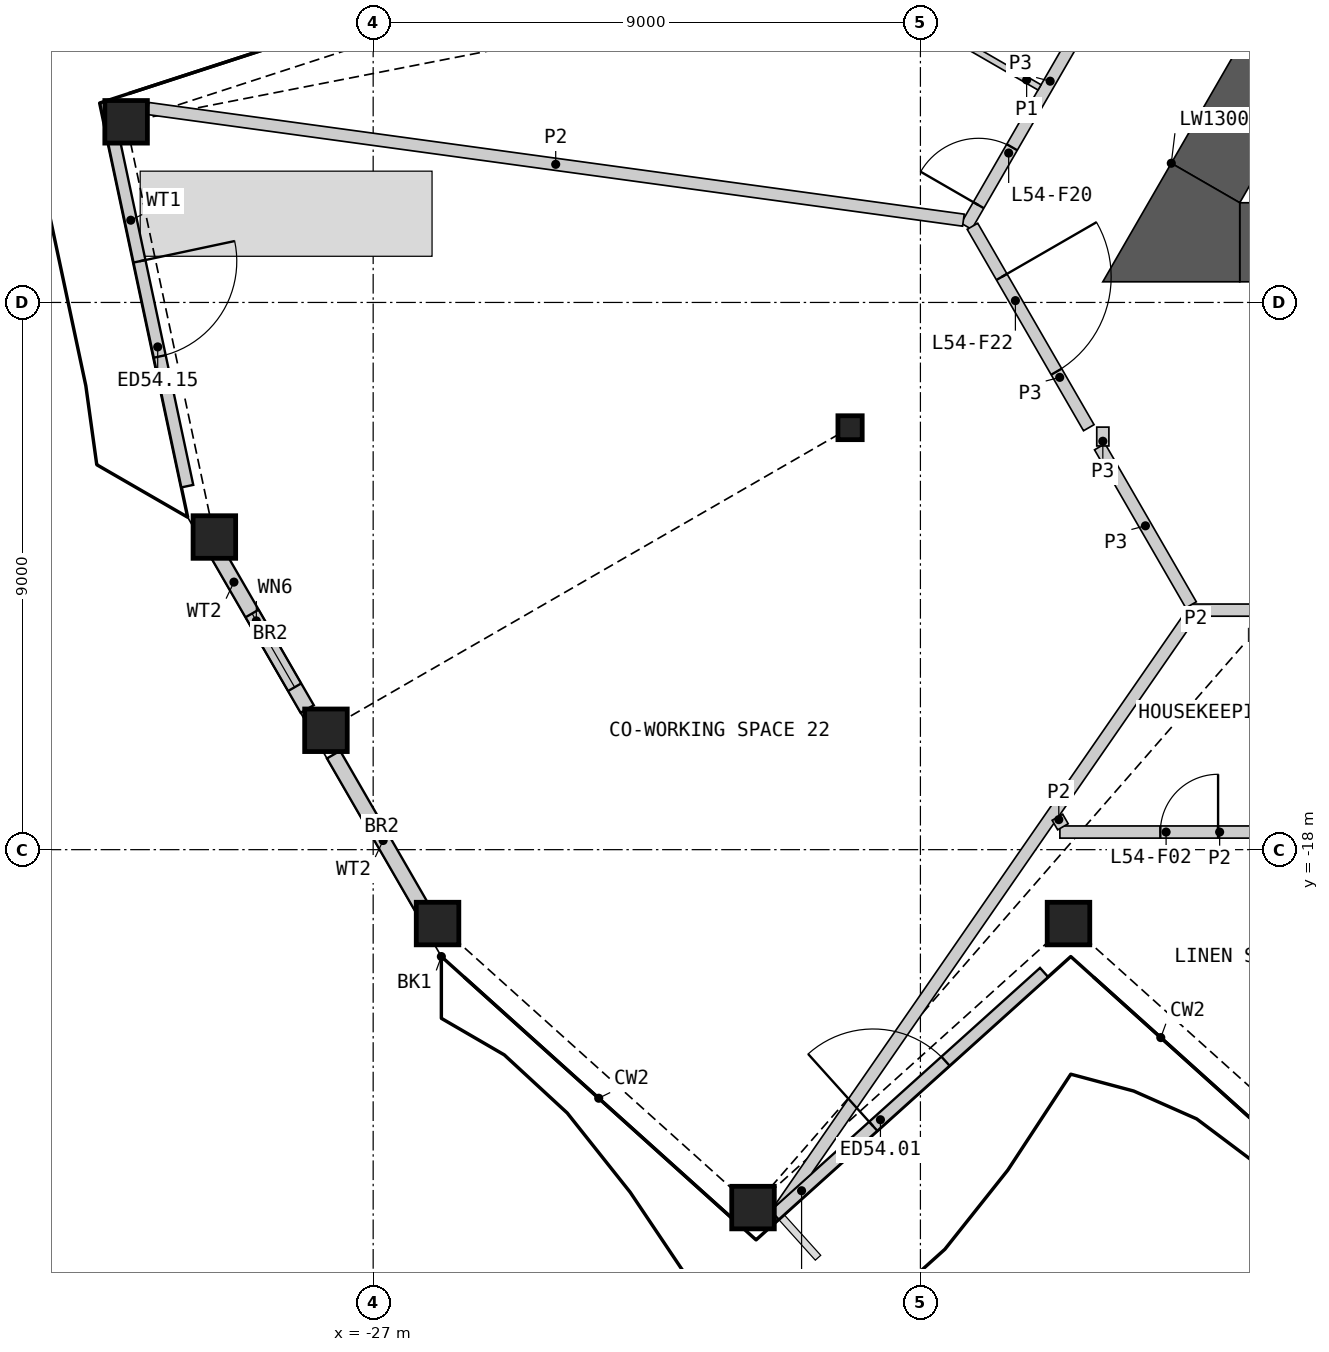
"""IFC4 building model, lengths in metres.
Left out: names, types, materials, properties, quantities, classifications, styles, units other than length and angle.
Written with IfcOpenShell. Run it as: python <this file> out.ifc"""

import sys

from ifc_helpers import new_model, si_unit, direction, frame, frame_2d, origin, origin_2d, place, context, subcontext, project, spatial, polyline, rectangle, hollow_rectangle, i_section, outline, extrude, element, fill, save


model = new_model("IFC4")
c1 = context("Model", 3, precision=1e-05, world=origin(), true_north=direction((0.0, 1.0)))
c2 = subcontext(c1, "Body", "Model", "MODEL_VIEW")
j1 = project(units=[si_unit("LENGTHUNIT", "METRE"), si_unit("PLANEANGLEUNIT", "RADIAN")], contexts=[c1])
p1 = place(None, origin())
s1 = spatial("IfcSite", under=j1, at=p1, CompositionType="ELEMENT")
p2 = place(p1, origin())
s2 = spatial("IfcBuilding", under=s1, at=p2, CompositionType="ELEMENT")
p3 = place(p2, frame((0.0, 0.0, 245.4)))
s3 = spatial("IfcBuildingStorey", under=s2, at=p3, CompositionType="ELEMENT", Elevation=245.4)
for number, where, z_axis, x_axis in (
    (1, (-25.941, -19.215, 0.0), (0.0, 0.0, 1.0), (1.0, 0.0, 0.0)),
    (2, (-20.753, -23.887, 0.0), (0.0, 0.0, 1.0), (1.0, 0.0, 0.0)),
    (3, (-15.565, -19.215, 0.0), (0.0, 0.0, 1.0), (1.0, 0.0, 0.0)),
    (4, (-31.063, -6.029, 0.0), (0.0, 0.0, 1.0), (1.0, 0.0, 0.0)),
    (5, (-29.612, -12.858, 0.0), (0.0, 0.0, 1.0), (1.0, 0.0, 0.0)),
    (6, (-27.776, -16.037, 0.0), (0.0, 0.0, 1.0), (1.0, 0.0, 0.0)),
):
    element("IfcColumn", number, at=place(p3, frame(where, z_axis=z_axis, x_axis=x_axis)), inside=s3, PredefinedType="COLUMN", context=c2, shape_type="SweptSolid", body=[
        extrude(hollow_rectangle(XDim=0.7, YDim=0.7, WallThickness=0.045, at=origin_2d()), origin(), (0.0, 0.0, 1.0), 3.6),
    ])
p4 = place(p3, frame((-19.157, -11.06, 0.0), z_axis=(0.0, 0.0, 1.0), x_axis=(1.0, 0.0, 0.0)))
e7 = element("IfcColumn", 7, at=p4, inside=s3, PredefinedType="COLUMN", context=c2, shape_type="SweptSolid", body=[
    extrude(i_section(OverallWidth=0.399, OverallDepth=0.393, WebThickness=0.023, FlangeThickness=0.037, at=origin_2d()), origin(), (0.0, 0.0, 1.0), 3.6),
])
p5 = place(p3, frame((-20.397, -24.009, 0.0), z_axis=(0.0, 0.0, 1.0), x_axis=(0.74315161366, 0.669123067241, 0.0)))
e8 = element("IfcWall", 8, at=p5, inside=s3, PredefinedType="SOLIDWALL", context=c2, shape_type="SweptSolid", body=[
    extrude(rectangle(XDim=5.963, YDim=0.2, at=frame_2d((2.981, 0.0))), origin(), (0.0, 0.0, 1.0), 2.701),
])
p6 = place(p5, frame((2.181, 0.0, 0.0)))
e9 = element("IfcOpeningElement", 9, at=p6, cuts=e8, PredefinedType="OPENING", context=c2, shape_type="SweptSolid", body=[
    extrude(rectangle(XDim=1.6, YDim=2.4, at=frame_2d((0.8, 1.2))), frame((0.0, 0.11, 0.0), z_axis=(0.0, -1.0, 0.0), x_axis=(1.0, 0.0, 0.0)), (0.0, 0.0, 1.0), 0.22),
])
p7 = place(p3, frame((-31.296, -6.189, 0.0), z_axis=(0.0, 0.0, 1.0), x_axis=(0.207920947907, -0.978145633033, 0.0)))
e10 = element("IfcWall", 10, at=p7, inside=s3, PredefinedType="SOLIDWALL", context=c2, shape_type="SweptSolid", body=[
    extrude(rectangle(XDim=5.963, YDim=0.2, at=frame_2d((2.981, 0.0))), origin(), (0.0, 0.0, 1.0), 2.701),
])
p8 = place(p7, frame((2.181, 0.0, 0.0)))
e11 = element("IfcOpeningElement", 11, at=p8, cuts=e10, PredefinedType="OPENING", context=c2, shape_type="SweptSolid", body=[
    extrude(rectangle(XDim=1.6, YDim=2.4, at=frame_2d((0.8, 1.2))), frame((0.0, 0.11, 0.0), z_axis=(0.0, -1.0, 0.0), x_axis=(1.0, 0.0, 0.0)), (0.0, 0.0, 1.0), 0.22),
])
p9 = place(p3, frame((-29.692, -12.904, 0.0), z_axis=(0.0, 0.0, 1.0), x_axis=(0.499987708133, -0.866032500381, 0.0)))
e12 = element("IfcWall", 12, at=p9, inside=s3, PredefinedType="SOLIDWALL", context=c2, shape_type="SweptSolid", body=[
    extrude(rectangle(XDim=3.213, YDim=0.25, at=frame_2d((1.607, 0.0))), origin(), (0.0, 0.0, 1.0), 2.701),
])
p10 = place(p9, frame((1.4, 0.0, 1.9)))
e13 = element("IfcOpeningElement", 13, at=p10, cuts=e12, PredefinedType="OPENING", context=c2, shape_type="SweptSolid", body=[
    extrude(rectangle(XDim=1.4, YDim=0.6, at=frame_2d((0.7, 0.3))), frame((0.0, 0.135, 0.0), z_axis=(0.0, -1.0, 0.0), x_axis=(1.0, 0.0, 0.0)), (0.0, 0.0, 1.0), 0.27),
])
p11 = place(p3, frame((-27.652, -16.437, 0.0), z_axis=(0.0, 0.0, 1.0), x_axis=(0.500026945261, -0.866009846372, 0.0)))
e14 = element("IfcWall", 14, at=p11, inside=s3, PredefinedType="SOLIDWALL", context=c2, shape_type="SweptSolid", body=[
    extrude(rectangle(XDim=3.262, YDim=0.25, at=frame_2d((1.631, 0.0))), origin(), (0.0, 0.0, 1.0), 2.701),
])
p12 = place(p3, frame((-12.748, -8.01, 0.0), z_axis=(0.0, 0.0, 1.0), x_axis=(1.0, 0.0, 0.0)))
e15 = element("IfcWall", 15, at=p12, inside=s3, PredefinedType="SHEAR", context=c2, shape_type="SweptSolid", body=[
    extrude(rectangle(XDim=4.26, YDim=1.3, at=frame_2d((2.13, 0.0))), origin(), (0.0, 0.0, 1.0), 3.25),
])
p13 = place(p3, frame((-10.338, -1.885, 0.0), z_axis=(0.0, 0.0, 1.0), x_axis=(-0.499975944838, -0.866039291593, 0.0)))
e16 = element("IfcWall", 16, at=p13, inside=s3, PredefinedType="SHEAR", context=c2, shape_type="SweptSolid", body=[
    extrude(rectangle(XDim=5.947, YDim=1.3, at=frame_2d((2.974, 0.0))), origin(), (0.0, 0.0, 1.0), 3.25),
])
p14 = place(p3, origin())
e17 = element("IfcWall", 17, at=p14, inside=s3, PredefinedType="SHEAR", context=c2, shape_type="SweptSolid", body=[
    extrude(outline(polyline([(-13.874, -6.71), (-12.748, -7.36), (-12.748, -8.66), (-15.0, -8.66), (-13.874, -6.71)])), origin(), (0.0, 0.0, 1.0), 3.25),
])
p15 = place(p3, frame((-13.599, -14.06, 0.0), z_axis=(0.0, 0.0, 1.0), x_axis=(1.0, 0.0, 0.0)))
e18 = element("IfcWall", 18, at=p15, inside=s3, PredefinedType="PARTITIONING", context=c2, shape_type="SweptSolid", body=[
    extrude(rectangle(XDim=27.198, YDim=0.2, at=frame_2d((13.599, 0.0))), origin(), (0.0, 0.0, 1.0), 3.25),
])
p16 = place(p15, frame((1.152, 0.0, 0.0)))
e19 = element("IfcOpeningElement", 19, at=p16, cuts=e18, PredefinedType="OPENING", context=c2, shape_type="SweptSolid", body=[
    extrude(rectangle(XDim=0.95, YDim=2.1, at=frame_2d((0.475, 1.05))), frame((0.0, 0.11, 0.0), z_axis=(0.0, -1.0, 0.0), x_axis=(1.0, 0.0, 0.0)), (0.0, 0.0, 1.0), 0.22),
])
p17 = place(p15, frame((16.311, 0.0, 0.0)))
e20 = element("IfcOpeningElement", 20, at=p17, cuts=e18, PredefinedType="OPENING", context=c2, shape_type="SweptSolid", body=[
    extrude(rectangle(XDim=1.1, YDim=2.1, at=frame_2d((0.55, 1.05))), frame((0.0, 0.11, 0.0), z_axis=(0.0, -1.0, 0.0), x_axis=(1.0, 0.0, 0.0)), (0.0, 0.0, 1.0), 0.22),
])
p18 = place(p15, frame((25.747, 0.0, 0.0)))
e21 = element("IfcOpeningElement", 21, at=p18, cuts=e18, PredefinedType="OPENING", context=c2, shape_type="SweptSolid", body=[
    extrude(rectangle(XDim=1.1, YDim=2.1, at=frame_2d((0.55, 1.05))), frame((0.0, 0.11, 0.0), z_axis=(0.0, -1.0, 0.0), x_axis=(1.0, 0.0, 0.0)), (0.0, 0.0, 1.0), 0.22),
])
p19 = place(p3, frame((-17.244, -7.747, 0.0), z_axis=(0.0, 0.0, 1.0), x_axis=(0.500017753321, 0.866015153657, 0.0)))
e22 = element("IfcWall", 22, at=p19, inside=s3, PredefinedType="PARTITIONING", context=c2, shape_type="SweptSolid", body=[
    extrude(rectangle(XDim=5.51, YDim=0.2, at=frame_2d((2.755, 0.0))), origin(), (0.0, 0.0, 1.0), 3.25),
])
p20 = place(p19, frame((0.401, 0.0, 0.0)))
e23 = element("IfcOpeningElement", 23, at=p20, cuts=e22, PredefinedType="OPENING", context=c2, shape_type="SweptSolid", body=[
    extrude(rectangle(XDim=1.1, YDim=2.1, at=frame_2d((0.55, 1.05))), frame((0.0, 0.11, 0.0), z_axis=(0.0, -1.0, 0.0), x_axis=(1.0, 0.0, 0.0)), (0.0, 0.0, 1.0), 0.22),
])
p21 = place(p3, frame((-17.144, -7.747, 0.0), z_axis=(0.0, 0.0, 1.0), x_axis=(0.499961815444, -0.866047448526, 0.0)))
e24 = element("IfcWall", 24, at=p21, inside=s3, PredefinedType="PARTITIONING", context=c2, shape_type="SweptSolid", body=[
    extrude(rectangle(XDim=3.826, YDim=0.2, at=frame_2d((1.913, 0.0))), origin(), (0.0, 0.0, 1.0), 3.25),
])
p22 = place(p21, frame((0.962, 0.0, 0.0)))
e25 = element("IfcOpeningElement", 25, at=p22, cuts=e24, PredefinedType="OPENING", context=c2, shape_type="SweptSolid", body=[
    extrude(rectangle(XDim=1.8, YDim=2.1, at=frame_2d((0.9, 1.05))), frame((0.0, 0.11, 0.0), z_axis=(0.0, -1.0, 0.0), x_axis=(1.0, 0.0, 0.0)), (0.0, 0.0, 1.0), 0.22),
])
p23 = place(p3, frame((-15.05, -11.374, 0.0), z_axis=(0.0, 0.0, 1.0), x_axis=(0.500048608389, -0.865997337899, 0.0)))
e26 = element("IfcWall", 26, at=p23, inside=s3, PredefinedType="PARTITIONING", context=c2, shape_type="SweptSolid", body=[
    extrude(rectangle(XDim=3.002, YDim=0.2, at=frame_2d((1.501, 0.0))), origin(), (0.0, 0.0, 1.0), 3.25),
])
p24 = place(p3, frame((-15.0, -11.36, 0.0), z_axis=(0.0, 0.0, 1.0), x_axis=(0.0, 1.0, 0.0)))
e27 = element("IfcWall", 27, at=p24, inside=s3, PredefinedType="PARTITIONING", context=c2, shape_type="SweptSolid", body=[
    extrude(rectangle(XDim=0.31, YDim=0.2, at=frame_2d((0.155, 0.0))), origin(), (0.0, 0.0, 1.0), 3.25),
])
p25 = place(p3, frame((-30.703, -5.81, 0.0), z_axis=(0.0, 0.0, 1.0), x_axis=(0.99075075074, -0.135694325259, 0.0)))
e28 = element("IfcWall", 28, at=p25, inside=s3, PredefinedType="PARTITIONING", context=c2, shape_type="SweptSolid", body=[
    extrude(rectangle(XDim=13.535, YDim=0.2, at=frame_2d((6.768, 0.0))), origin(), (0.0, 0.0, 1.0), 2.404),
])
p26 = place(p3, origin())
e29 = element("IfcWall", 29, at=p26, inside=s3, PredefinedType="PARTITIONING", context=c2, shape_type="SweptSolid", body=[
    extrude(outline(polyline([(-13.473, -14.199), (-19.794, -23.331), (-20.439, -23.912), (-13.638, -14.086), (-13.473, -14.199)])), origin(), (0.0, 0.0, 1.0), 2.404),
])
p27 = place(p3, frame((-15.706, -17.71, 0.0), z_axis=(0.0, 0.0, 1.0), x_axis=(1.0, 0.0, 0.0)))
e30 = element("IfcWall", 30, at=p27, inside=s3, PredefinedType="PARTITIONING", context=c2, shape_type="SweptSolid", body=[
    extrude(rectangle(XDim=5.255, YDim=0.2, at=frame_2d((2.627, 0.0))), origin(), (0.0, 0.0, 1.0), 2.404),
])
p28 = place(p27, frame((1.652, 0.0, 0.0)))
e31 = element("IfcOpeningElement", 31, at=p28, cuts=e30, PredefinedType="OPENING", context=c2, shape_type="SweptSolid", body=[
    extrude(rectangle(XDim=0.95, YDim=2.1, at=frame_2d((0.475, 1.05))), frame((0.0, 0.11, 0.0), z_axis=(0.0, -1.0, 0.0), x_axis=(1.0, 0.0, 0.0)), (0.0, 0.0, 1.0), 0.22),
])
p29 = place(p3, frame((-15.747, -17.467, 0.0), z_axis=(0.0, 0.0, 1.0), x_axis=(0.498749683645, -0.866746071848, 0.0)))
e32 = element("IfcWall", 32, at=p29, inside=s3, PredefinedType="PARTITIONING", context=c2, shape_type="SweptSolid", body=[
    extrude(rectangle(XDim=0.181, YDim=0.2, at=frame_2d((0.091, 0.0))), origin(), (0.0, 0.0, 1.0), 2.404),
])
p30 = place(p3, frame((-18.163, -4.238, 0.0), z_axis=(0.0, 0.0, 1.0), x_axis=(0.866014668023, -0.500018594424, 0.0)))
e33 = element("IfcWall", 33, at=p30, inside=s3, PredefinedType="PARTITIONING", context=c2, shape_type="SweptSolid", body=[
    extrude(rectangle(XDim=2.45, YDim=0.1, at=frame_2d((1.225, 0.0))), origin(), (0.0, 0.0, 1.0), 2.404),
])
p31 = place(p6, origin())
e34 = element("IfcDoor", 34, at=p31, inside=s3, OperationType="DOUBLE_DOOR_SINGLE_SWING", PredefinedType="DOOR", context=c2, shape_type="SweptSolid", body=[
    extrude(rectangle(XDim=1.6, YDim=2.4, at=frame_2d((0.8, 1.2))), frame((0.0, 0.025, 0.0), z_axis=(0.0, -1.0, 0.0), x_axis=(1.0, 0.0, 0.0)), (0.0, 0.0, 1.0), 0.05),
])
fill(e9, e34)
p32 = place(p8, origin())
e35 = element("IfcDoor", 35, at=p32, inside=s3, OperationType="DOUBLE_DOOR_SINGLE_SWING", PredefinedType="DOOR", context=c2, shape_type="SweptSolid", body=[
    extrude(rectangle(XDim=1.6, YDim=2.4, at=frame_2d((0.8, 1.2))), frame((0.0, 0.025, 0.0), z_axis=(0.0, -1.0, 0.0), x_axis=(1.0, 0.0, 0.0)), (0.0, 0.0, 1.0), 0.05),
])
fill(e11, e35)
p33 = place(p10, origin())
e36 = element("IfcWindow", 36, at=p33, inside=s3, PartitioningType="SINGLE_PANEL", PredefinedType="WINDOW", context=c2, shape_type="SweptSolid", body=[
    extrude(rectangle(XDim=1.4, YDim=0.6, at=frame_2d((0.7, 0.3))), frame((0.0, 0.03, 0.0), z_axis=(0.0, -1.0, 0.0), x_axis=(1.0, 0.0, 0.0)), (0.0, 0.0, 1.0), 0.06),
])
fill(e13, e36)
p34 = place(p28, origin())
e37 = element("IfcDoor", 37, at=p34, inside=s3, OperationType="SINGLE_SWING_RIGHT", PredefinedType="DOOR", context=c2, shape_type="SweptSolid", body=[
    extrude(rectangle(XDim=0.95, YDim=2.1, at=frame_2d((0.475, 1.05))), frame((0.0, 0.025, 0.0), z_axis=(0.0, -1.0, 0.0), x_axis=(1.0, 0.0, 0.0)), (0.0, 0.0, 1.0), 0.05),
])
fill(e31, e37)
p35 = place(p20, origin())
e38 = element("IfcDoor", 38, at=p35, inside=s3, OperationType="SINGLE_SWING_LEFT", PredefinedType="DOOR", context=c2, shape_type="SweptSolid", body=[
    extrude(rectangle(XDim=1.1, YDim=2.1, at=frame_2d((0.55, 1.05))), frame((0.0, 0.025, 0.0), z_axis=(0.0, -1.0, 0.0), x_axis=(1.0, 0.0, 0.0)), (0.0, 0.0, 1.0), 0.05),
])
fill(e23, e38)
p36 = place(p22, origin())
e39 = element("IfcDoor", 39, at=p36, inside=s3, OperationType="DOUBLE_DOOR_SINGLE_SWING", PredefinedType="DOOR", context=c2, shape_type="SweptSolid", body=[
    extrude(rectangle(XDim=1.8, YDim=2.1, at=frame_2d((0.9, 1.05))), frame((0.0, 0.025, 0.0), z_axis=(0.0, -1.0, 0.0), x_axis=(1.0, 0.0, 0.0)), (0.0, 0.0, 1.0), 0.05),
])
fill(e25, e39)
save(model, sys.argv[1])
